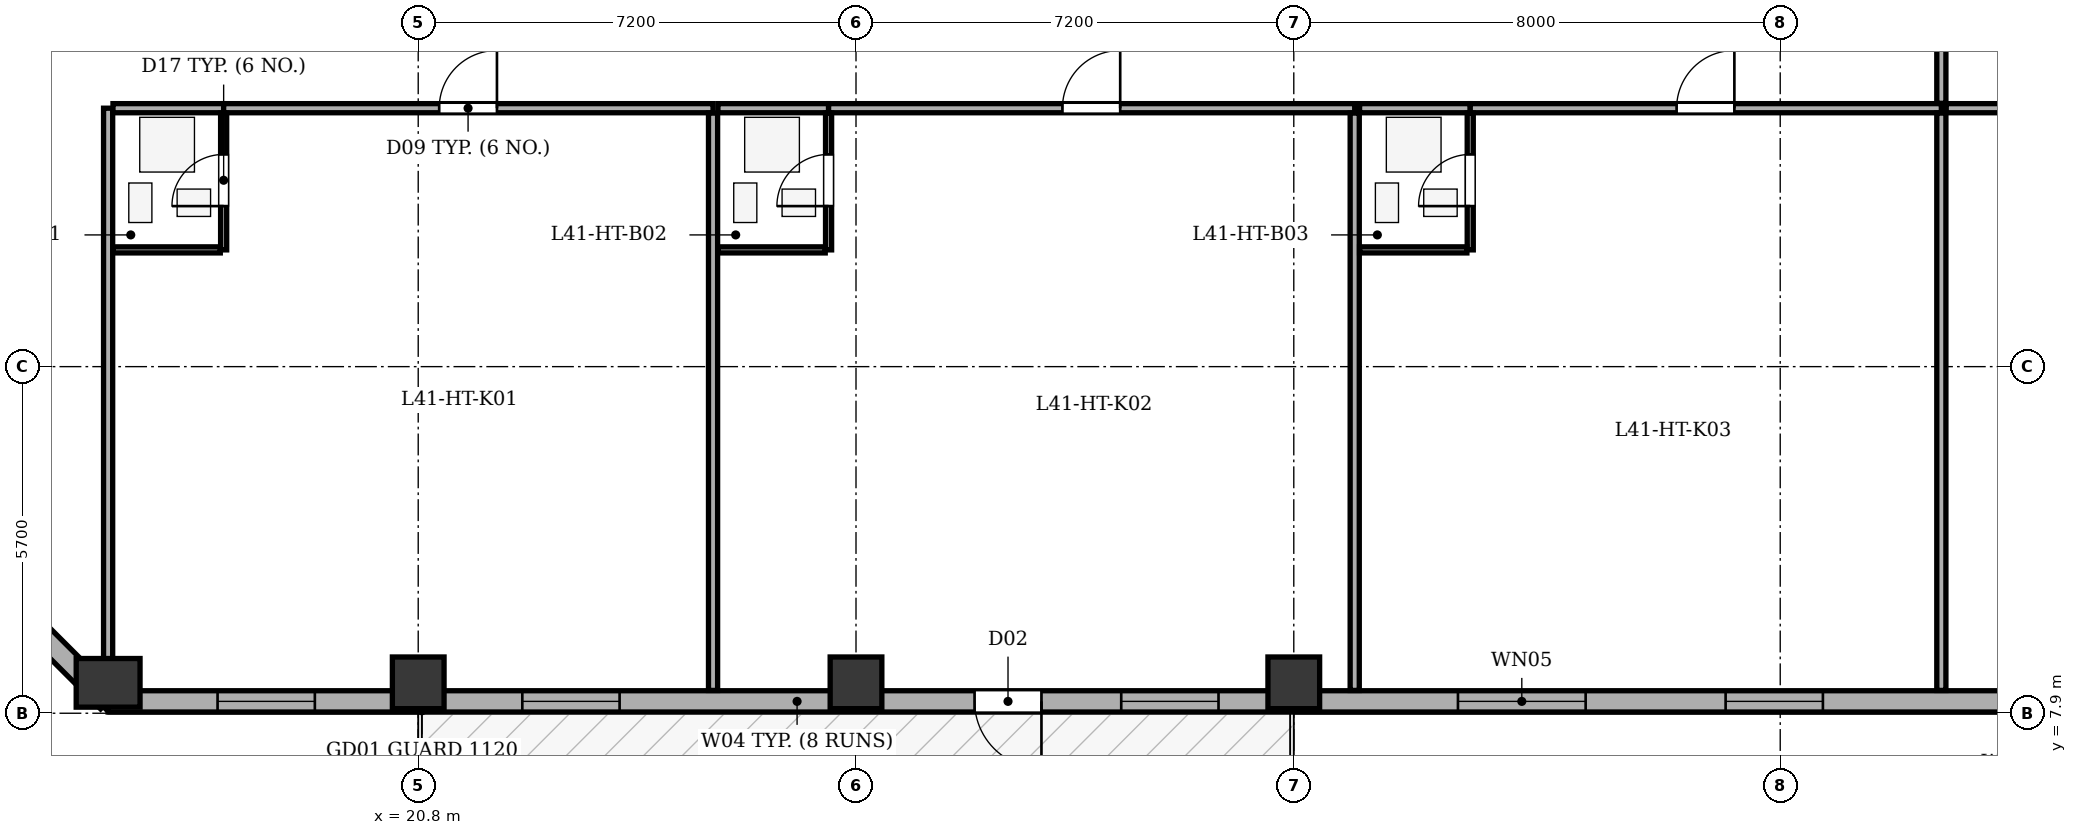
"""IFC4 building model, lengths in metres.
Left out: names, types, materials, properties, quantities, classifications, styles, units other than length and angle.
Written with IfcOpenShell. Run it as: python <this file> out.ifc"""

import sys

from ifc_helpers import new_model, si_unit, direction, frame, frame_2d, origin, origin_2d, place, context, subcontext, project, spatial, rectangle, extrude, element, fill, save


model = new_model("IFC4")
c1 = context("Model", 3, precision=1e-05, world=origin(), true_north=direction((0.0, 1.0)))
c2 = subcontext(c1, "Body", "Model", "MODEL_VIEW")
j1 = project(units=[si_unit("LENGTHUNIT", "METRE"), si_unit("PLANEANGLEUNIT", "RADIAN")], contexts=[c1])
p1 = place(None, origin())
s1 = spatial("IfcSite", under=j1, at=p1, CompositionType="ELEMENT")
p2 = place(p1, origin())
s2 = spatial("IfcBuilding", under=s1, at=p2, CompositionType="ELEMENT")
p3 = place(p2, frame((0.0, 0.0, 162.3)))
s3 = spatial("IfcBuildingStorey", under=s2, at=p3, CompositionType="ELEMENT", Elevation=162.3)
p4 = place(p3, frame((15.7, 8.4, 0.0), z_axis=(0.0, 0.0, 1.0), x_axis=(1.0, 0.0, 0.0)))
e1 = element("IfcColumn", 1, at=p4, inside=s3, PredefinedType="COLUMN", context=c2, shape_type="SweptSolid", body=[
    extrude(rectangle(XDim=0.8, YDim=1.05, at=origin_2d()), origin(), (0.0, 0.0, 1.0), 3.5),
])
for number, where, z_axis, x_axis in (
    (2, (20.8, 8.4, 0.0), (0.0, 0.0, 1.0), (1.0, 0.0, 0.0)),
    (3, (28.0, 8.4, 0.0), (0.0, 0.0, 1.0), (1.0, 0.0, 0.0)),
    (4, (35.2, 8.4, 0.0), (0.0, 0.0, 1.0), (1.0, 0.0, 0.0)),
):
    element("IfcColumn", number, at=place(p3, frame(where, z_axis=z_axis, x_axis=x_axis)), inside=s3, PredefinedType="COLUMN", context=c2, shape_type="SweptSolid", body=[
        extrude(rectangle(XDim=0.85, YDim=0.85, at=origin_2d()), origin(), (0.0, 0.0, 1.0), 3.5),
    ])
p5 = place(p3, frame((50.7, 8.095, 0.0), z_axis=(0.0, 0.0, 1.0), x_axis=(-1.0, 0.0, 0.0)))
e5 = element("IfcWall", 5, at=p5, inside=s3, PredefinedType="STANDARD", context=c2, shape_type="SweptSolid", body=[
    extrude(rectangle(XDim=35.0, YDim=0.35, at=frame_2d((17.5, 0.0))), origin(), (0.0, 0.0, 1.0), 2.785),
])
p6 = place(p5, frame((19.65, 0.0, 0.0)))
e6 = element("IfcOpeningElement", 6, at=p6, cuts=e5, PredefinedType="OPENING", context=c2, shape_type="SweptSolid", body=[
    extrude(rectangle(XDim=1.1, YDim=2.05, at=frame_2d((0.55, 1.025))), frame((0.0, 0.185, 0.0), z_axis=(0.0, -1.0, 0.0), x_axis=(1.0, 0.0, 0.0)), (0.0, 0.0, 1.0), 0.37),
])
p7 = place(p5, frame((1.763, 0.0, 0.75)))
e7 = element("IfcOpeningElement", 7, at=p7, cuts=e5, PredefinedType="OPENING", context=c2, shape_type="SweptSolid", body=[
    extrude(rectangle(XDim=1.6, YDim=1.75, at=frame_2d((0.8, 0.875))), frame((0.0, 0.185, 0.0), z_axis=(0.0, -1.0, 0.0), x_axis=(1.0, 0.0, 0.0)), (0.0, 0.0, 1.0), 0.37),
])
p8 = place(p5, frame((6.798, 0.0, 0.75)))
e8 = element("IfcOpeningElement", 8, at=p8, cuts=e5, PredefinedType="OPENING", context=c2, shape_type="SweptSolid", body=[
    extrude(rectangle(XDim=1.6, YDim=1.75, at=frame_2d((0.8, 0.875))), frame((0.0, 0.185, 0.0), z_axis=(0.0, -1.0, 0.0), x_axis=(1.0, 0.0, 0.0)), (0.0, 0.0, 1.0), 0.37),
])
p9 = place(p5, frame((10.7, 0.0, 0.75)))
e9 = element("IfcOpeningElement", 9, at=p9, cuts=e5, PredefinedType="OPENING", context=c2, shape_type="SweptSolid", body=[
    extrude(rectangle(XDim=2.1, YDim=1.75, at=frame_2d((1.05, 0.875))), frame((0.0, 0.185, 0.0), z_axis=(0.0, -1.0, 0.0), x_axis=(1.0, 0.0, 0.0)), (0.0, 0.0, 1.0), 0.37),
])
p10 = place(p5, frame((16.738, 0.0, 0.75)))
e10 = element("IfcOpeningElement", 10, at=p10, cuts=e5, PredefinedType="OPENING", context=c2, shape_type="SweptSolid", body=[
    extrude(rectangle(XDim=1.6, YDim=1.75, at=frame_2d((0.8, 0.875))), frame((0.0, 0.185, 0.0), z_axis=(0.0, -1.0, 0.0), x_axis=(1.0, 0.0, 0.0)), (0.0, 0.0, 1.0), 0.37),
])
p11 = place(p5, frame((26.588, 0.0, 0.75)))
e11 = element("IfcOpeningElement", 11, at=p11, cuts=e5, PredefinedType="OPENING", context=c2, shape_type="SweptSolid", body=[
    extrude(rectangle(XDim=1.6, YDim=1.75, at=frame_2d((0.8, 0.875))), frame((0.0, 0.185, 0.0), z_axis=(0.0, -1.0, 0.0), x_axis=(1.0, 0.0, 0.0)), (0.0, 0.0, 1.0), 0.37),
])
p12 = place(p5, frame((31.6, 0.0, 0.75)))
e12 = element("IfcOpeningElement", 12, at=p12, cuts=e5, PredefinedType="OPENING", context=c2, shape_type="SweptSolid", body=[
    extrude(rectangle(XDim=1.6, YDim=1.75, at=frame_2d((0.8, 0.875))), frame((0.0, 0.185, 0.0), z_axis=(0.0, -1.0, 0.0), x_axis=(1.0, 0.0, 0.0)), (0.0, 0.0, 1.0), 0.37),
])
p13 = place(p3, frame((15.7, 8.095, 0.0), z_axis=(0.0, 0.0, 1.0), x_axis=(-0.707106781187, 0.707106781187, 0.0)))
e13 = element("IfcWall", 13, at=p13, inside=s3, PredefinedType="STANDARD", context=c2, shape_type="SweptSolid", body=[
    extrude(rectangle(XDim=6.795, YDim=0.35, at=frame_2d((3.397, 0.0))), origin(), (0.0, 0.0, 1.0), 2.785),
])
p14 = place(p13, frame((2.698, 0.0, 0.75)))
e14 = element("IfcOpeningElement", 14, at=p14, cuts=e13, PredefinedType="OPENING", context=c2, shape_type="SweptSolid", body=[
    extrude(rectangle(XDim=1.4, YDim=1.65, at=frame_2d((0.7, 0.825))), frame((0.0, 0.185, 0.0), z_axis=(0.0, -1.0, 0.0), x_axis=(1.0, 0.0, 0.0)), (0.0, 0.0, 1.0), 0.37),
])
p15 = place(p3, frame((15.7, 8.275, 0.0), z_axis=(0.0, 0.0, 1.0), x_axis=(0.0, 1.0, 0.0)))
e15 = element("IfcWall", 15, at=p15, inside=s3, PredefinedType="PARTITIONING", context=c2, shape_type="SweptSolid", body=[
    extrude(rectangle(XDim=9.575, YDim=0.15, at=frame_2d((4.788, 0.0))), origin(), (0.0, 0.0, 1.0), 3.2),
])
p16 = place(p3, frame((15.78, 17.85, 0.0), z_axis=(0.0, 0.0, 1.0), x_axis=(1.0, 0.0, 0.0)))
e16 = element("IfcWall", 16, at=p16, inside=s3, PredefinedType="PARTITIONING", context=c2, shape_type="SweptSolid", body=[
    extrude(rectangle(XDim=1.82, YDim=0.15, at=frame_2d((0.91, 0.0))), origin(), (0.0, 0.0, 1.0), 3.2),
])
p17 = place(p3, frame((17.6, 17.85, 0.0), z_axis=(0.0, 0.0, 1.0), x_axis=(1.0, 0.0, 0.0)))
e17 = element("IfcWall", 17, at=p17, inside=s3, PredefinedType="PARTITIONING", context=c2, shape_type="SweptSolid", body=[
    extrude(rectangle(XDim=8.049, YDim=0.15, at=frame_2d((4.024, 0.0))), origin(), (0.0, 0.0, 1.0), 3.2),
])
p18 = place(p17, frame((3.545, 0.0, 0.0)))
e18 = element("IfcOpeningElement", 18, at=p18, cuts=e17, PredefinedType="OPENING", context=c2, shape_type="SweptSolid", body=[
    extrude(rectangle(XDim=0.95, YDim=2.1, at=frame_2d((0.475, 1.05))), frame((0.0, 0.085, 0.0), z_axis=(0.0, -1.0, 0.0), x_axis=(1.0, 0.0, 0.0)), (0.0, 0.0, 1.0), 0.17),
])
p19 = place(p3, frame((17.6, 15.52, 0.0), z_axis=(0.0, 0.0, 1.0), x_axis=(0.0, 1.0, 0.0)))
e19 = element("IfcWall", 19, at=p19, inside=s3, PredefinedType="PARTITIONING", context=c2, shape_type="SweptSolid", body=[
    extrude(rectangle(XDim=2.25, YDim=0.1, at=frame_2d((1.125, 0.0))), origin(), (0.0, 0.0, 1.0), 3.2),
])
p20 = place(p19, frame((0.72, 0.0, 0.0)))
e20 = element("IfcOpeningElement", 20, at=p20, cuts=e19, PredefinedType="OPENING", context=c2, shape_type="SweptSolid", body=[
    extrude(rectangle(XDim=0.85, YDim=2.05, at=frame_2d((0.425, 1.025))), frame((0.0, 0.06, 0.0), z_axis=(0.0, -1.0, 0.0), x_axis=(1.0, 0.0, 0.0)), (0.0, 0.0, 1.0), 0.12),
])
p21 = place(p3, frame((15.78, 15.52, 0.0), z_axis=(0.0, 0.0, 1.0), x_axis=(1.0, 0.0, 0.0)))
e21 = element("IfcWall", 21, at=p21, inside=s3, PredefinedType="PARTITIONING", context=c2, shape_type="SweptSolid", body=[
    extrude(rectangle(XDim=1.765, YDim=0.1, at=frame_2d((0.882, 0.0))), origin(), (0.0, 0.0, 1.0), 3.2),
])
p22 = place(p3, frame((25.649, 8.275, 0.0), z_axis=(0.0, 0.0, 1.0), x_axis=(0.0, 1.0, 0.0)))
e22 = element("IfcWall", 22, at=p22, inside=s3, PredefinedType="PARTITIONING", context=c2, shape_type="SweptSolid", body=[
    extrude(rectangle(XDim=9.495, YDim=0.15, at=frame_2d((4.748, 0.0))), origin(), (0.0, 0.0, 1.0), 3.2),
])
p23 = place(p3, frame((25.729, 17.85, 0.0), z_axis=(0.0, 0.0, 1.0), x_axis=(1.0, 0.0, 0.0)))
e23 = element("IfcWall", 23, at=p23, inside=s3, PredefinedType="PARTITIONING", context=c2, shape_type="SweptSolid", body=[
    extrude(rectangle(XDim=1.82, YDim=0.15, at=frame_2d((0.91, 0.0))), origin(), (0.0, 0.0, 1.0), 3.2),
])
p24 = place(p3, frame((27.549, 17.85, 0.0), z_axis=(0.0, 0.0, 1.0), x_axis=(1.0, 0.0, 0.0)))
e24 = element("IfcWall", 24, at=p24, inside=s3, PredefinedType="PARTITIONING", context=c2, shape_type="SweptSolid", body=[
    extrude(rectangle(XDim=8.653, YDim=0.15, at=frame_2d((4.326, 0.0))), origin(), (0.0, 0.0, 1.0), 3.2),
])
p25 = place(p24, frame((3.846, 0.0, 0.0)))
e25 = element("IfcOpeningElement", 25, at=p25, cuts=e24, PredefinedType="OPENING", context=c2, shape_type="SweptSolid", body=[
    extrude(rectangle(XDim=0.95, YDim=2.1, at=frame_2d((0.475, 1.05))), frame((0.0, 0.085, 0.0), z_axis=(0.0, -1.0, 0.0), x_axis=(1.0, 0.0, 0.0)), (0.0, 0.0, 1.0), 0.17),
])
p26 = place(p3, frame((27.549, 15.52, 0.0), z_axis=(0.0, 0.0, 1.0), x_axis=(0.0, 1.0, 0.0)))
e26 = element("IfcWall", 26, at=p26, inside=s3, PredefinedType="PARTITIONING", context=c2, shape_type="SweptSolid", body=[
    extrude(rectangle(XDim=2.25, YDim=0.1, at=frame_2d((1.125, 0.0))), origin(), (0.0, 0.0, 1.0), 3.2),
])
p27 = place(p26, frame((0.72, 0.0, 0.0)))
e27 = element("IfcOpeningElement", 27, at=p27, cuts=e26, PredefinedType="OPENING", context=c2, shape_type="SweptSolid", body=[
    extrude(rectangle(XDim=0.85, YDim=2.05, at=frame_2d((0.425, 1.025))), frame((0.0, 0.06, 0.0), z_axis=(0.0, -1.0, 0.0), x_axis=(1.0, 0.0, 0.0)), (0.0, 0.0, 1.0), 0.12),
])
p28 = place(p3, frame((25.729, 15.52, 0.0), z_axis=(0.0, 0.0, 1.0), x_axis=(1.0, 0.0, 0.0)))
e28 = element("IfcWall", 28, at=p28, inside=s3, PredefinedType="PARTITIONING", context=c2, shape_type="SweptSolid", body=[
    extrude(rectangle(XDim=1.765, YDim=0.1, at=frame_2d((0.882, 0.0))), origin(), (0.0, 0.0, 1.0), 3.2),
])
p29 = place(p3, frame((36.202, 8.275, 0.0), z_axis=(0.0, 0.0, 1.0), x_axis=(0.0, 1.0, 0.0)))
e29 = element("IfcWall", 29, at=p29, inside=s3, PredefinedType="PARTITIONING", context=c2, shape_type="SweptSolid", body=[
    extrude(rectangle(XDim=9.495, YDim=0.15, at=frame_2d((4.748, 0.0))), origin(), (0.0, 0.0, 1.0), 3.2),
])
p30 = place(p3, frame((36.282, 17.85, 0.0), z_axis=(0.0, 0.0, 1.0), x_axis=(1.0, 0.0, 0.0)))
e30 = element("IfcWall", 30, at=p30, inside=s3, PredefinedType="PARTITIONING", context=c2, shape_type="SweptSolid", body=[
    extrude(rectangle(XDim=1.82, YDim=0.15, at=frame_2d((0.91, 0.0))), origin(), (0.0, 0.0, 1.0), 3.2),
])
p31 = place(p3, frame((38.102, 17.85, 0.0), z_axis=(0.0, 0.0, 1.0), x_axis=(1.0, 0.0, 0.0)))
e31 = element("IfcWall", 31, at=p31, inside=s3, PredefinedType="PARTITIONING", context=c2, shape_type="SweptSolid", body=[
    extrude(rectangle(XDim=7.748, YDim=0.15, at=frame_2d((3.874, 0.0))), origin(), (0.0, 0.0, 1.0), 3.2),
])
p32 = place(p31, frame((3.394, 0.0, 0.0)))
e32 = element("IfcOpeningElement", 32, at=p32, cuts=e31, PredefinedType="OPENING", context=c2, shape_type="SweptSolid", body=[
    extrude(rectangle(XDim=0.95, YDim=2.1, at=frame_2d((0.475, 1.05))), frame((0.0, 0.085, 0.0), z_axis=(0.0, -1.0, 0.0), x_axis=(1.0, 0.0, 0.0)), (0.0, 0.0, 1.0), 0.17),
])
p33 = place(p3, frame((38.102, 15.52, 0.0), z_axis=(0.0, 0.0, 1.0), x_axis=(0.0, 1.0, 0.0)))
e33 = element("IfcWall", 33, at=p33, inside=s3, PredefinedType="PARTITIONING", context=c2, shape_type="SweptSolid", body=[
    extrude(rectangle(XDim=2.25, YDim=0.1, at=frame_2d((1.125, 0.0))), origin(), (0.0, 0.0, 1.0), 3.2),
])
p34 = place(p33, frame((0.72, 0.0, 0.0)))
e34 = element("IfcOpeningElement", 34, at=p34, cuts=e33, PredefinedType="OPENING", context=c2, shape_type="SweptSolid", body=[
    extrude(rectangle(XDim=0.85, YDim=2.05, at=frame_2d((0.425, 1.025))), frame((0.0, 0.06, 0.0), z_axis=(0.0, -1.0, 0.0), x_axis=(1.0, 0.0, 0.0)), (0.0, 0.0, 1.0), 0.12),
])
p35 = place(p3, frame((36.282, 15.52, 0.0), z_axis=(0.0, 0.0, 1.0), x_axis=(1.0, 0.0, 0.0)))
e35 = element("IfcWall", 35, at=p35, inside=s3, PredefinedType="PARTITIONING", context=c2, shape_type="SweptSolid", body=[
    extrude(rectangle(XDim=1.765, YDim=0.1, at=frame_2d((0.883, 0.0))), origin(), (0.0, 0.0, 1.0), 3.2),
])
p36 = place(p3, frame((45.85, 8.275, 0.0), z_axis=(0.0, 0.0, 1.0), x_axis=(0.0, 1.0, 0.0)))
e36 = element("IfcWall", 36, at=p36, inside=s3, PredefinedType="PARTITIONING", context=c2, shape_type="SweptSolid", body=[
    extrude(rectangle(XDim=9.495, YDim=0.15, at=frame_2d((4.748, 0.0))), origin(), (0.0, 0.0, 1.0), 3.2),
])
p37 = place(p3, frame((45.93, 17.85, 0.0), z_axis=(0.0, 0.0, 1.0), x_axis=(1.0, 0.0, 0.0)))
e37 = element("IfcWall", 37, at=p37, inside=s3, PredefinedType="PARTITIONING", context=c2, shape_type="SweptSolid", body=[
    extrude(rectangle(XDim=9.395, YDim=0.15, at=frame_2d((4.698, 0.0))), origin(), (0.0, 0.0, 1.0), 3.2),
])
p38 = place(p3, frame((45.85, 17.93, 0.0), z_axis=(0.0, 0.0, 1.0), x_axis=(0.0, 1.0, 0.0)))
e38 = element("IfcWall", 38, at=p38, inside=s3, PredefinedType="PARTITIONING", context=c2, shape_type="SweptSolid", body=[
    extrude(rectangle(XDim=18.54, YDim=0.15, at=frame_2d((9.27, 0.0))), origin(), (0.0, 0.0, 1.0), 3.2),
])
p39 = place(p38, frame((8.79, 0.0, 0.0)))
e39 = element("IfcOpeningElement", 39, at=p39, cuts=e38, PredefinedType="OPENING", context=c2, shape_type="SweptSolid", body=[
    extrude(rectangle(XDim=0.95, YDim=2.1, at=frame_2d((0.475, 1.05))), frame((0.0, 0.085, 0.0), z_axis=(0.0, -1.0, 0.0), x_axis=(1.0, 0.0, 0.0)), (0.0, 0.0, 1.0), 0.17),
])
p40 = place(p6, origin())
e40 = element("IfcDoor", 40, at=p40, inside=s3, OperationType="SINGLE_SWING_LEFT", PredefinedType="DOOR", context=c2, shape_type="SweptSolid", body=[
    extrude(rectangle(XDim=1.1, YDim=2.05, at=frame_2d((0.55, 1.025))), frame((0.0, 0.025, 0.0), z_axis=(0.0, -1.0, 0.0), x_axis=(1.0, 0.0, 0.0)), (0.0, 0.0, 1.0), 0.05),
])
fill(e6, e40)
p41 = place(p8, origin())
e41 = element("IfcWindow", 41, at=p41, inside=s3, PartitioningType="SINGLE_PANEL", PredefinedType="WINDOW", context=c2, shape_type="SweptSolid", body=[
    extrude(rectangle(XDim=1.6, YDim=1.75, at=frame_2d((0.8, 0.875))), frame((0.0, -0.01, 0.0), z_axis=(0.0, -1.0, 0.0), x_axis=(1.0, 0.0, 0.0)), (0.0, 0.0, 1.0), 0.06),
])
fill(e8, e41)
p42 = place(p9, origin())
e42 = element("IfcWindow", 42, at=p42, inside=s3, PartitioningType="SINGLE_PANEL", PredefinedType="WINDOW", context=c2, shape_type="SweptSolid", body=[
    extrude(rectangle(XDim=2.1, YDim=1.75, at=frame_2d((1.05, 0.875))), frame((0.0, -0.01, 0.0), z_axis=(0.0, -1.0, 0.0), x_axis=(1.0, 0.0, 0.0)), (0.0, 0.0, 1.0), 0.06),
])
fill(e9, e42)
p43 = place(p10, origin())
e43 = element("IfcWindow", 43, at=p43, inside=s3, PartitioningType="SINGLE_PANEL", PredefinedType="WINDOW", context=c2, shape_type="SweptSolid", body=[
    extrude(rectangle(XDim=1.6, YDim=1.75, at=frame_2d((0.8, 0.875))), frame((0.0, -0.01, 0.0), z_axis=(0.0, -1.0, 0.0), x_axis=(1.0, 0.0, 0.0)), (0.0, 0.0, 1.0), 0.06),
])
fill(e10, e43)
p44 = place(p11, origin())
e44 = element("IfcWindow", 44, at=p44, inside=s3, PartitioningType="SINGLE_PANEL", PredefinedType="WINDOW", context=c2, shape_type="SweptSolid", body=[
    extrude(rectangle(XDim=1.6, YDim=1.75, at=frame_2d((0.8, 0.875))), frame((0.0, -0.01, 0.0), z_axis=(0.0, -1.0, 0.0), x_axis=(1.0, 0.0, 0.0)), (0.0, 0.0, 1.0), 0.06),
])
fill(e11, e44)
p45 = place(p12, origin())
e45 = element("IfcWindow", 45, at=p45, inside=s3, PartitioningType="SINGLE_PANEL", PredefinedType="WINDOW", context=c2, shape_type="SweptSolid", body=[
    extrude(rectangle(XDim=1.6, YDim=1.75, at=frame_2d((0.8, 0.875))), frame((0.0, -0.01, 0.0), z_axis=(0.0, -1.0, 0.0), x_axis=(1.0, 0.0, 0.0)), (0.0, 0.0, 1.0), 0.06),
])
fill(e12, e45)
p46 = place(p20, origin())
e46 = element("IfcDoor", 46, at=p46, inside=s3, OperationType="SINGLE_SWING_LEFT", PredefinedType="DOOR", context=c2, shape_type="SweptSolid", body=[
    extrude(rectangle(XDim=0.85, YDim=2.05, at=frame_2d((0.425, 1.025))), frame((0.0, 0.025, 0.0), z_axis=(0.0, -1.0, 0.0), x_axis=(1.0, 0.0, 0.0)), (0.0, 0.0, 1.0), 0.05),
])
fill(e20, e46)
p47 = place(p18, origin())
e47 = element("IfcDoor", 47, at=p47, inside=s3, OperationType="SINGLE_SWING_RIGHT", PredefinedType="DOOR", context=c2, shape_type="SweptSolid", body=[
    extrude(rectangle(XDim=0.95, YDim=2.1, at=frame_2d((0.475, 1.05))), frame((0.0, 0.025, 0.0), z_axis=(0.0, -1.0, 0.0), x_axis=(1.0, 0.0, 0.0)), (0.0, 0.0, 1.0), 0.05),
])
fill(e18, e47)
p48 = place(p27, origin())
e48 = element("IfcDoor", 48, at=p48, inside=s3, OperationType="SINGLE_SWING_LEFT", PredefinedType="DOOR", context=c2, shape_type="SweptSolid", body=[
    extrude(rectangle(XDim=0.85, YDim=2.05, at=frame_2d((0.425, 1.025))), frame((0.0, 0.025, 0.0), z_axis=(0.0, -1.0, 0.0), x_axis=(1.0, 0.0, 0.0)), (0.0, 0.0, 1.0), 0.05),
])
fill(e27, e48)
p49 = place(p25, origin())
e49 = element("IfcDoor", 49, at=p49, inside=s3, OperationType="SINGLE_SWING_RIGHT", PredefinedType="DOOR", context=c2, shape_type="SweptSolid", body=[
    extrude(rectangle(XDim=0.95, YDim=2.1, at=frame_2d((0.475, 1.05))), frame((0.0, 0.025, 0.0), z_axis=(0.0, -1.0, 0.0), x_axis=(1.0, 0.0, 0.0)), (0.0, 0.0, 1.0), 0.05),
])
fill(e25, e49)
p50 = place(p34, origin())
e50 = element("IfcDoor", 50, at=p50, inside=s3, OperationType="SINGLE_SWING_LEFT", PredefinedType="DOOR", context=c2, shape_type="SweptSolid", body=[
    extrude(rectangle(XDim=0.85, YDim=2.05, at=frame_2d((0.425, 1.025))), frame((0.0, 0.025, 0.0), z_axis=(0.0, -1.0, 0.0), x_axis=(1.0, 0.0, 0.0)), (0.0, 0.0, 1.0), 0.05),
])
fill(e34, e50)
p51 = place(p32, origin())
e51 = element("IfcDoor", 51, at=p51, inside=s3, OperationType="SINGLE_SWING_RIGHT", PredefinedType="DOOR", context=c2, shape_type="SweptSolid", body=[
    extrude(rectangle(XDim=0.95, YDim=2.1, at=frame_2d((0.475, 1.05))), frame((0.0, 0.025, 0.0), z_axis=(0.0, -1.0, 0.0), x_axis=(1.0, 0.0, 0.0)), (0.0, 0.0, 1.0), 0.05),
])
fill(e32, e51)
save(model, sys.argv[1])
